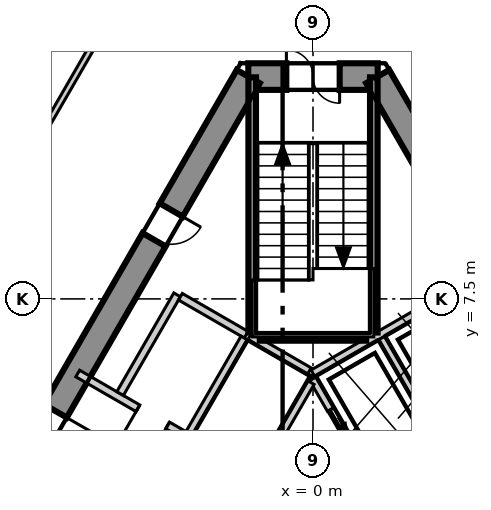
"""IFC4 building model, lengths in metres.
Left out: names, types, materials, properties, quantities, classifications, styles, units other than length and angle.
Written with IfcOpenShell. Run it as: python <this file> out.ifc"""

import sys

from ifc_helpers import new_model, si_unit, direction, frame, frame_2d, origin, place, context, subcontext, project, spatial, polyline, rectangle, outline, extrude, element, fill, save


model = new_model("IFC4")
c1 = context("Model", 3, precision=1e-05, world=origin(), true_north=direction((0.0, 1.0)))
c2 = subcontext(c1, "Body", "Model", "MODEL_VIEW")
j1 = project(units=[si_unit("LENGTHUNIT", "METRE"), si_unit("PLANEANGLEUNIT", "RADIAN")], contexts=[c1])
p1 = place(None, origin())
s1 = spatial("IfcSite", under=j1, at=p1, CompositionType="ELEMENT")
p2 = place(p1, origin())
s2 = spatial("IfcBuilding", under=s1, at=p2, CompositionType="ELEMENT")
p3 = place(p2, frame((0.0, 0.0, 203.3)))
s3 = spatial("IfcBuildingStorey", under=s2, at=p3, CompositionType="ELEMENT", Elevation=203.3)
p4 = place(p3, frame((1.703, 13.35, -0.3), z_axis=(0.0, 0.0, 1.0), x_axis=(-1.0, 0.0, 0.0)))
e1 = element("IfcWall", 1, at=p4, inside=s3, PredefinedType="SHEAR", context=c2, shape_type="SweptSolid", body=[
    extrude(outline(polyline([(-0.202, -0.35), (1.703, -0.35), (3.608, -0.35), (3.204, 0.35), (1.703, 0.35), (0.202, 0.35), (-0.202, -0.35)])), origin(), (0.0, 0.0, 1.0), 4.0),
])
p5 = place(p4, frame((1.003, 0.0, 0.3)))
e2 = element("IfcOpeningElement", 2, at=p5, cuts=e1, PredefinedType="OPENING", context=c2, shape_type="SweptSolid", body=[
    extrude(rectangle(XDim=1.4, YDim=2.1, at=frame_2d((0.7, 1.05))), frame((0.0, 0.36, 0.0), z_axis=(0.0, -1.0, 0.0), x_axis=(1.0, 0.0, 0.0)), (0.0, 0.0, 1.0), 0.72),
])
p6 = place(p3, frame((-1.703, 13.35, -0.3), z_axis=(0.0, 0.0, 1.0), x_axis=(-0.500011533395, -0.866018744874, 0.0)))
e3 = element("IfcWall", 3, at=p6, inside=s3, PredefinedType="SHEAR", context=c2, shape_type="SweptSolid", body=[
    extrude(outline(polyline([(-0.202, -0.35), (1.782, -0.35), (3.766, -0.35), (5.75, -0.35), (7.734, -0.35), (9.718, -0.35), (11.702, -0.35), (13.686, -0.35), (15.67, -0.35), (17.654, -0.35), (19.638, -0.35), (21.622, -0.35), (21.218, 0.35), (19.307, 0.35), (17.397, 0.35), (15.486, 0.35), (13.576, 0.35), (11.665, 0.35), (9.755, 0.35), (7.844, 0.35), (5.934, 0.35), (4.023, 0.35), (2.113, 0.35), (0.202, 0.35), (-0.202, -0.35)])), origin(), (0.0, 0.0, 1.0), 4.0),
])
p7 = place(p6, frame((10.16, 0.0, 0.3)))
e4 = element("IfcOpeningElement", 4, at=p7, cuts=e3, PredefinedType="OPENING", context=c2, shape_type="SweptSolid", body=[
    extrude(rectangle(XDim=1.1, YDim=2.1, at=frame_2d((0.55, 1.05))), frame((0.0, 0.36, 0.0), z_axis=(0.0, -1.0, 0.0), x_axis=(1.0, 0.0, 0.0)), (0.0, 0.0, 1.0), 0.72),
])
p8 = place(p6, frame((4.055, 0.0, 0.3)))
e5 = element("IfcOpeningElement", 5, at=p8, cuts=e3, PredefinedType="OPENING", context=c2, shape_type="SweptSolid", body=[
    extrude(rectangle(XDim=0.9, YDim=2.1, at=frame_2d((0.45, 1.05))), frame((0.0, 0.36, 0.0), z_axis=(0.0, -1.0, 0.0), x_axis=(1.0, 0.0, 0.0)), (0.0, 0.0, 1.0), 0.72),
])
p9 = place(p3, frame((12.413, -5.2, -0.3), z_axis=(0.0, 0.0, 1.0), x_axis=(-0.500011533395, 0.866018744874, 0.0)))
e6 = element("IfcWall", 6, at=p9, inside=s3, PredefinedType="SHEAR", context=c2, shape_type="SweptSolid", body=[
    extrude(outline(polyline([(-0.202, -0.35), (1.782, -0.35), (3.766, -0.35), (5.75, -0.35), (7.734, -0.35), (9.718, -0.35), (11.702, -0.35), (13.686, -0.35), (15.67, -0.35), (17.654, -0.35), (19.638, -0.35), (21.622, -0.35), (21.218, 0.35), (19.307, 0.35), (17.397, 0.35), (15.486, 0.35), (13.576, 0.35), (11.665, 0.35), (9.755, 0.35), (7.844, 0.35), (5.934, 0.35), (4.023, 0.35), (2.113, 0.35), (0.202, 0.35), (-0.202, -0.35)])), origin(), (0.0, 0.0, 1.0), 4.0),
])
p10 = place(p9, frame((4.055, 0.0, 0.3)))
e7 = element("IfcOpeningElement", 7, at=p10, cuts=e6, PredefinedType="OPENING", context=c2, shape_type="SweptSolid", body=[
    extrude(rectangle(XDim=0.9, YDim=2.1, at=frame_2d((0.45, 1.05))), frame((0.0, 0.36, 0.0), z_axis=(0.0, -1.0, 0.0), x_axis=(1.0, 0.0, 0.0)), (0.0, 0.0, 1.0), 0.72),
])
p11 = place(p9, frame((16.415, 0.0, 0.3)))
e8 = element("IfcOpeningElement", 8, at=p11, cuts=e6, PredefinedType="OPENING", context=c2, shape_type="SweptSolid", body=[
    extrude(rectangle(XDim=1.0, YDim=2.1, at=frame_2d((0.5, 1.05))), frame((0.0, 0.36, 0.0), z_axis=(0.0, -1.0, 0.0), x_axis=(1.0, 0.0, 0.0)), (0.0, 0.0, 1.0), 0.72),
])
p12 = place(p3, frame((-2.824, 31.513, 0.0), z_axis=(0.0, 0.0, 1.0), x_axis=(-0.500012324412, -0.866018288165, 0.0)))
e9 = element("IfcWall", 9, at=p12, inside=s3, PredefinedType="ELEMENTEDWALL", context=c2, shape_type="SweptSolid", body=[
    extrude(rectangle(XDim=51.739, YDim=0.2, at=frame_2d((25.87, 0.0))), origin(), (0.0, 0.0, 1.0), 3.7),
])
p13 = place(p12, frame((2.275, 0.0, 0.9)))
e10 = element("IfcOpeningElement", 10, at=p13, cuts=e9, PredefinedType="OPENING", context=c2, shape_type="SweptSolid", body=[
    extrude(rectangle(XDim=4.2, YDim=2.5, at=frame_2d((2.1, 1.25))), frame((0.0, 0.11, 0.0), z_axis=(0.0, -1.0, 0.0), x_axis=(1.0, 0.0, 0.0)), (0.0, 0.0, 1.0), 0.22),
])
p14 = place(p12, frame((8.419, 0.0, 0.9)))
e11 = element("IfcOpeningElement", 11, at=p14, cuts=e9, PredefinedType="OPENING", context=c2, shape_type="SweptSolid", body=[
    extrude(rectangle(XDim=4.2, YDim=2.5, at=frame_2d((2.1, 1.25))), frame((0.0, 0.11, 0.0), z_axis=(0.0, -1.0, 0.0), x_axis=(1.0, 0.0, 0.0)), (0.0, 0.0, 1.0), 0.22),
])
p15 = place(p12, frame((14.563, 0.0, 0.9)))
e12 = element("IfcOpeningElement", 12, at=p15, cuts=e9, PredefinedType="OPENING", context=c2, shape_type="SweptSolid", body=[
    extrude(rectangle(XDim=4.2, YDim=2.5, at=frame_2d((2.1, 1.25))), frame((0.0, 0.11, 0.0), z_axis=(0.0, -1.0, 0.0), x_axis=(1.0, 0.0, 0.0)), (0.0, 0.0, 1.0), 0.22),
])
p16 = place(p12, frame((20.707, 0.0, 0.9)))
e13 = element("IfcOpeningElement", 13, at=p16, cuts=e9, PredefinedType="OPENING", context=c2, shape_type="SweptSolid", body=[
    extrude(rectangle(XDim=4.2, YDim=2.5, at=frame_2d((2.1, 1.25))), frame((0.0, 0.11, 0.0), z_axis=(0.0, -1.0, 0.0), x_axis=(1.0, 0.0, 0.0)), (0.0, 0.0, 1.0), 0.22),
])
p17 = place(p12, frame((26.851, 0.0, 0.9)))
e14 = element("IfcOpeningElement", 14, at=p17, cuts=e9, PredefinedType="OPENING", context=c2, shape_type="SweptSolid", body=[
    extrude(rectangle(XDim=4.2, YDim=2.5, at=frame_2d((2.1, 1.25))), frame((0.0, 0.11, 0.0), z_axis=(0.0, -1.0, 0.0), x_axis=(1.0, 0.0, 0.0)), (0.0, 0.0, 1.0), 0.22),
])
p18 = place(p12, frame((32.995, 0.0, 0.9)))
e15 = element("IfcOpeningElement", 15, at=p18, cuts=e9, PredefinedType="OPENING", context=c2, shape_type="SweptSolid", body=[
    extrude(rectangle(XDim=4.2, YDim=2.5, at=frame_2d((2.1, 1.25))), frame((0.0, 0.11, 0.0), z_axis=(0.0, -1.0, 0.0), x_axis=(1.0, 0.0, 0.0)), (0.0, 0.0, 1.0), 0.22),
])
p19 = place(p12, frame((39.14, 0.0, 0.9)))
e16 = element("IfcOpeningElement", 16, at=p19, cuts=e9, PredefinedType="OPENING", context=c2, shape_type="SweptSolid", body=[
    extrude(rectangle(XDim=4.2, YDim=2.5, at=frame_2d((2.1, 1.25))), frame((0.0, 0.11, 0.0), z_axis=(0.0, -1.0, 0.0), x_axis=(1.0, 0.0, 0.0)), (0.0, 0.0, 1.0), 0.22),
])
p20 = place(p12, frame((45.284, 0.0, 0.9)))
e17 = element("IfcOpeningElement", 17, at=p20, cuts=e9, PredefinedType="OPENING", context=c2, shape_type="SweptSolid", body=[
    extrude(rectangle(XDim=4.2, YDim=2.5, at=frame_2d((2.1, 1.25))), frame((0.0, 0.11, 0.0), z_axis=(0.0, -1.0, 0.0), x_axis=(1.0, 0.0, 0.0)), (0.0, 0.0, 1.0), 0.22),
])
p21 = place(p3, frame((-20.883, -11.97, 0.0), z_axis=(0.0, 0.0, 1.0), x_axis=(0.500006150555, 0.866021852731, 0.0)))
e18 = element("IfcWall", 18, at=p21, inside=s3, PredefinedType="PARTITIONING", context=c2, shape_type="SweptSolid", body=[
    extrude(rectangle(XDim=41.766, YDim=0.15, at=frame_2d((20.883, 0.0))), origin(), (0.0, 0.0, 1.0), 3.7),
])
p22 = place(p21, frame((36.916, 0.0, 0.0)))
e19 = element("IfcOpeningElement", 19, at=p22, cuts=e18, PredefinedType="OPENING", context=c2, shape_type="SweptSolid", body=[
    extrude(rectangle(XDim=1.1, YDim=2.1, at=frame_2d((0.55, 1.05))), frame((0.0, 0.085, 0.0), z_axis=(0.0, -1.0, 0.0), x_axis=(1.0, 0.0, 0.0)), (0.0, 0.0, 1.0), 0.17),
])
p23 = place(p21, frame((26.446, 0.0, 0.0)))
e20 = element("IfcOpeningElement", 20, at=p23, cuts=e18, PredefinedType="OPENING", context=c2, shape_type="SweptSolid", body=[
    extrude(rectangle(XDim=1.1, YDim=2.1, at=frame_2d((0.55, 1.05))), frame((0.0, 0.085, 0.0), z_axis=(0.0, -1.0, 0.0), x_axis=(1.0, 0.0, 0.0)), (0.0, 0.0, 1.0), 0.17),
])
p24 = place(p21, frame((9.757, 0.0, 0.0)))
e21 = element("IfcOpeningElement", 21, at=p24, cuts=e18, PredefinedType="OPENING", context=c2, shape_type="SweptSolid", body=[
    extrude(rectangle(XDim=1.1, YDim=2.1, at=frame_2d((0.55, 1.05))), frame((0.0, 0.085, 0.0), z_axis=(0.0, -1.0, 0.0), x_axis=(1.0, 0.0, 0.0)), (0.0, 0.0, 1.0), 0.17),
])
p25 = place(p21, frame((18.757, 0.0, 0.0)))
e22 = element("IfcOpeningElement", 22, at=p25, cuts=e18, PredefinedType="OPENING", context=c2, shape_type="SweptSolid", body=[
    extrude(rectangle(XDim=0.9, YDim=2.1, at=frame_2d((0.45, 1.05))), frame((0.0, 0.085, 0.0), z_axis=(0.0, -1.0, 0.0), x_axis=(1.0, 0.0, 0.0)), (0.0, 0.0, 1.0), 0.17),
])
p26 = place(p21, frame((15.557, 0.0, 0.0)))
e23 = element("IfcOpeningElement", 23, at=p26, cuts=e18, PredefinedType="OPENING", context=c2, shape_type="SweptSolid", body=[
    extrude(rectangle(XDim=0.9, YDim=2.1, at=frame_2d((0.45, 1.05))), frame((0.0, 0.085, 0.0), z_axis=(0.0, -1.0, 0.0), x_axis=(1.0, 0.0, 0.0)), (0.0, 0.0, 1.0), 0.17),
])
p27 = place(p21, frame((12.657, 0.0, 0.0)))
e24 = element("IfcOpeningElement", 24, at=p27, cuts=e18, PredefinedType="OPENING", context=c2, shape_type="SweptSolid", body=[
    extrude(rectangle(XDim=1.0, YDim=2.1, at=frame_2d((0.5, 1.05))), frame((0.0, 0.085, 0.0), z_axis=(0.0, -1.0, 0.0), x_axis=(1.0, 0.0, 0.0)), (0.0, 0.0, 1.0), 0.17),
])
p28 = place(p21, frame((3.669, 0.0, 0.0)))
e25 = element("IfcOpeningElement", 25, at=p28, cuts=e18, PredefinedType="OPENING", context=c2, shape_type="SweptSolid", body=[
    extrude(rectangle(XDim=1.1, YDim=2.1, at=frame_2d((0.55, 1.05))), frame((0.0, 0.085, 0.0), z_axis=(0.0, -1.0, 0.0), x_axis=(1.0, 0.0, 0.0)), (0.0, 0.0, 1.0), 0.17),
])
p29 = place(p3, frame((0.075, 24.07, 0.0), z_axis=(0.0, 0.0, 1.0), x_axis=(0.500006834213, -0.866021458014, 0.0)))
e26 = element("IfcWall", 26, at=p29, inside=s3, PredefinedType="PARTITIONING", context=c2, shape_type="SweptSolid", body=[
    extrude(rectangle(XDim=41.616, YDim=0.15, at=frame_2d((20.808, 0.0))), origin(), (0.0, 0.0, 1.0), 3.7),
])
p30 = place(p29, frame((36.915, 0.0, 0.0)))
e27 = element("IfcOpeningElement", 27, at=p30, cuts=e26, PredefinedType="OPENING", context=c2, shape_type="SweptSolid", body=[
    extrude(rectangle(XDim=1.1, YDim=2.1, at=frame_2d((0.55, 1.05))), frame((0.0, 0.085, 0.0), z_axis=(0.0, -1.0, 0.0), x_axis=(1.0, 0.0, 0.0)), (0.0, 0.0, 1.0), 0.17),
])
p31 = place(p29, frame((22.046, 0.0, 0.0)))
e28 = element("IfcOpeningElement", 28, at=p31, cuts=e26, PredefinedType="OPENING", context=c2, shape_type="SweptSolid", body=[
    extrude(rectangle(XDim=1.1, YDim=2.1, at=frame_2d((0.55, 1.05))), frame((0.0, 0.085, 0.0), z_axis=(0.0, -1.0, 0.0), x_axis=(1.0, 0.0, 0.0)), (0.0, 0.0, 1.0), 0.17),
])
p32 = place(p29, frame((31.046, 0.0, 0.0)))
e29 = element("IfcOpeningElement", 29, at=p32, cuts=e26, PredefinedType="OPENING", context=c2, shape_type="SweptSolid", body=[
    extrude(rectangle(XDim=0.9, YDim=2.1, at=frame_2d((0.45, 1.05))), frame((0.0, 0.085, 0.0), z_axis=(0.0, -1.0, 0.0), x_axis=(1.0, 0.0, 0.0)), (0.0, 0.0, 1.0), 0.17),
])
p33 = place(p29, frame((27.846, 0.0, 0.0)))
e30 = element("IfcOpeningElement", 30, at=p33, cuts=e26, PredefinedType="OPENING", context=c2, shape_type="SweptSolid", body=[
    extrude(rectangle(XDim=0.9, YDim=2.1, at=frame_2d((0.45, 1.05))), frame((0.0, 0.085, 0.0), z_axis=(0.0, -1.0, 0.0), x_axis=(1.0, 0.0, 0.0)), (0.0, 0.0, 1.0), 0.17),
])
p34 = place(p29, frame((24.946, 0.0, 0.0)))
e31 = element("IfcOpeningElement", 31, at=p34, cuts=e26, PredefinedType="OPENING", context=c2, shape_type="SweptSolid", body=[
    extrude(rectangle(XDim=1.0, YDim=2.1, at=frame_2d((0.5, 1.05))), frame((0.0, 0.085, 0.0), z_axis=(0.0, -1.0, 0.0), x_axis=(1.0, 0.0, 0.0)), (0.0, 0.0, 1.0), 0.17),
])
p35 = place(p29, frame((17.258, 0.0, 0.0)))
e32 = element("IfcOpeningElement", 32, at=p35, cuts=e26, PredefinedType="OPENING", context=c2, shape_type="SweptSolid", body=[
    extrude(rectangle(XDim=1.0, YDim=2.1, at=frame_2d((0.5, 1.05))), frame((0.0, 0.085, 0.0), z_axis=(0.0, -1.0, 0.0), x_axis=(1.0, 0.0, 0.0)), (0.0, 0.0, 1.0), 0.17),
])
p36 = place(p29, frame((11.114, 0.0, 0.0)))
e33 = element("IfcOpeningElement", 33, at=p36, cuts=e26, PredefinedType="OPENING", context=c2, shape_type="SweptSolid", body=[
    extrude(rectangle(XDim=1.0, YDim=2.1, at=frame_2d((0.5, 1.05))), frame((0.0, 0.085, 0.0), z_axis=(0.0, -1.0, 0.0), x_axis=(1.0, 0.0, 0.0)), (0.0, 0.0, 1.0), 0.17),
])
p37 = place(p29, frame((3.669, 0.0, 0.0)))
e34 = element("IfcOpeningElement", 34, at=p37, cuts=e26, PredefinedType="OPENING", context=c2, shape_type="SweptSolid", body=[
    extrude(rectangle(XDim=1.0, YDim=2.1, at=frame_2d((0.5, 1.05))), frame((0.0, 0.085, 0.0), z_axis=(0.0, -1.0, 0.0), x_axis=(1.0, 0.0, 0.0)), (0.0, 0.0, 1.0), 0.17),
])
p38 = place(p3, frame((-12.82, 7.488, 0.0), z_axis=(0.0, 0.0, 1.0), x_axis=(0.500060781096, 0.865990308958, 0.0)))
e35 = element("IfcWall", 35, at=p38, inside=s3, PredefinedType="PARTITIONING", context=c2, shape_type="SweptSolid", body=[
    extrude(rectangle(XDim=12.139, YDim=0.15, at=frame_2d((6.069, 0.0))), origin(), (0.0, 0.0, 1.0), 3.7),
])
p39 = place(p38, frame((5.564, 0.0, 0.0)))
e36 = element("IfcOpeningElement", 36, at=p39, cuts=e35, PredefinedType="OPENING", context=c2, shape_type="SweptSolid", body=[
    extrude(rectangle(XDim=1.0, YDim=2.1, at=frame_2d((0.5, 1.05))), frame((0.0, 0.085, 0.0), z_axis=(0.0, -1.0, 0.0), x_axis=(1.0, 0.0, 0.0)), (0.0, 0.0, 1.0), 0.17),
])
p40 = place(p3, frame((-0.002, 5.541, 0.0), z_axis=(0.0, 0.0, 1.0), x_axis=(0.86600155993, 0.500041296494, 0.0)))
e37 = element("IfcWall", 37, at=p40, inside=s3, PredefinedType="SOLIDWALL", context=c2, shape_type="SweptSolid", body=[
    extrude(rectangle(XDim=4.132, YDim=0.2, at=frame_2d((2.066, 0.0))), origin(), (0.0, 0.0, 1.0), 3.7),
])
p41 = place(p3, frame((0.0, 5.4, 0.0), z_axis=(0.0, 0.0, 1.0), x_axis=(0.500103862429, -0.865965430478, 0.0)))
e38 = element("IfcWall", 38, at=p41, inside=s3, PredefinedType="SOLIDWALL", context=c2, shape_type="SweptSolid", body=[
    extrude(rectangle(XDim=2.973, YDim=0.2, at=frame_2d((1.487, 0.0))), origin(), (0.0, 0.0, 1.0), 3.7),
])
p42 = place(p41, frame((0.937, 0.0, 0.0)))
e39 = element("IfcOpeningElement", 39, at=p42, cuts=e38, PredefinedType="OPENING", context=c2, shape_type="SweptSolid", body=[
    extrude(rectangle(XDim=1.1, YDim=2.1, at=frame_2d((0.55, 1.05))), frame((0.0, 0.11, 0.0), z_axis=(0.0, -1.0, 0.0), x_axis=(1.0, 0.0, 0.0)), (0.0, 0.0, 1.0), 0.22),
])
p43 = place(p3, frame((1.578, 2.874, 0.0), z_axis=(0.0, 0.0, 1.0), x_axis=(0.866045911672, 0.499964477614, 0.0)))
e40 = element("IfcWall", 40, at=p43, inside=s3, PredefinedType="SOLIDWALL", context=c2, shape_type="SweptSolid", body=[
    extrude(rectangle(XDim=5.327, YDim=0.2, at=frame_2d((2.663, 0.0))), origin(), (0.0, 0.0, 1.0), 3.7),
])
p44 = place(p43, frame((2.496, 0.0, 0.0)))
e41 = element("IfcOpeningElement", 41, at=p44, cuts=e40, PredefinedType="OPENING", context=c2, shape_type="SweptSolid", body=[
    extrude(rectangle(XDim=1.1, YDim=2.1, at=frame_2d((0.55, 1.05))), frame((0.0, 0.11, 0.0), z_axis=(0.0, -1.0, 0.0), x_axis=(1.0, 0.0, 0.0)), (0.0, 0.0, 1.0), 0.22),
])
p45 = place(p3, frame((1.807, 6.47, 0.0), z_axis=(0.0, 0.0, 1.0), x_axis=(0.50012328804, -0.865954211699, 0.0)))
e42 = element("IfcWall", 42, at=p45, inside=s3, PredefinedType="SOLIDWALL", context=c2, shape_type="SweptSolid", body=[
    extrude(rectangle(XDim=2.9, YDim=0.2, at=frame_2d((1.45, 0.0))), origin(), (0.0, 0.0, 1.0), 3.7),
])
p46 = place(p3, frame((-6.191, 5.537, 0.0), z_axis=(0.0, 0.0, 1.0), x_axis=(0.866052607023, -0.499952879648, 0.0)))
e43 = element("IfcWall", 43, at=p46, inside=s3, PredefinedType="SOLIDWALL", context=c2, shape_type="SweptSolid", body=[
    extrude(rectangle(XDim=3.332, YDim=0.2, at=frame_2d((1.666, 0.0))), origin(), (0.0, 0.0, 1.0), 3.7),
])
p47 = place(p46, frame((1.83, 0.0, 0.0)))
e44 = element("IfcOpeningElement", 44, at=p47, cuts=e43, PredefinedType="OPENING", context=c2, shape_type="SweptSolid", body=[
    extrude(rectangle(XDim=0.9, YDim=2.1, at=frame_2d((0.45, 1.05))), frame((0.0, 0.11, 0.0), z_axis=(0.0, -1.0, 0.0), x_axis=(1.0, 0.0, 0.0)), (0.0, 0.0, 1.0), 0.22),
])
p48 = place(p3, frame((-5.076, 5.009, 0.0), z_axis=(0.0, 0.0, 1.0), x_axis=(0.50002537861, 0.866010750942, 0.0)))
e45 = element("IfcWall", 45, at=p48, inside=s3, PredefinedType="SOLIDWALL", context=c2, shape_type="SweptSolid", body=[
    extrude(rectangle(XDim=3.0, YDim=0.2, at=frame_2d((1.5, 0.0))), origin(), (0.0, 0.0, 1.0), 3.7),
])
p49 = place(p3, frame((-3.489, 7.557, 0.0), z_axis=(0.0, 0.0, 1.0), x_axis=(0.866010750942, -0.50002537861, 0.0)))
e46 = element("IfcWall", 46, at=p49, inside=s3, PredefinedType="SOLIDWALL", context=c2, shape_type="SweptSolid", body=[
    extrude(rectangle(XDim=2.0, YDim=0.2, at=frame_2d((1.0, 0.0))), origin(), (0.0, 0.0, 1.0), 3.7),
])
p50 = place(p3, frame((-3.257, 3.959, 0.0), z_axis=(0.0, 0.0, 1.0), x_axis=(0.50012328804, 0.865954211699, 0.0)))
e47 = element("IfcWall", 47, at=p50, inside=s3, PredefinedType="SOLIDWALL", context=c2, shape_type="SweptSolid", body=[
    extrude(rectangle(XDim=2.9, YDim=0.2, at=frame_2d((1.45, 0.0))), origin(), (0.0, 0.0, 1.0), 3.7),
])
p51 = place(p3, frame((-1.67, 6.507, 0.0), z_axis=(0.0, 0.0, 1.0), x_axis=(0.865941441609, -0.500145398563, 0.0)))
e48 = element("IfcWall", 48, at=p51, inside=s3, PredefinedType="SOLIDWALL", context=c2, shape_type="SweptSolid", body=[
    extrude(rectangle(XDim=1.815, YDim=0.2, at=frame_2d((0.908, 0.0))), origin(), (0.0, 0.0, 1.0), 3.7),
])
p52 = place(p3, frame((-1.438, 2.909, 0.0), z_axis=(0.0, 0.0, 1.0), x_axis=(0.499829630636, 0.866123744241, 0.0)))
e49 = element("IfcWall", 49, at=p52, inside=s3, PredefinedType="SOLIDWALL", context=c2, shape_type="SweptSolid", body=[
    extrude(rectangle(XDim=2.761, YDim=0.2, at=frame_2d((1.38, 0.0))), origin(), (0.0, 0.0, 1.0), 3.7),
])
p53 = place(p3, frame((1.6, 6.615, 0.0), z_axis=(0.0, 0.0, 1.0), x_axis=(0.0, 1.0, 0.0)))
e50 = element("IfcWall", 50, at=p53, inside=s3, PredefinedType="SOLIDWALL", context=c2, shape_type="SweptSolid", body=[
    extrude(rectangle(XDim=6.715, YDim=0.2, at=frame_2d((3.357, 0.0))), origin(), (0.0, 0.0, 1.0), 3.7),
])
p54 = place(p3, frame((-1.4, 6.5, 0.0), z_axis=(0.0, 0.0, 1.0), x_axis=(1.0, 0.0, 0.0)))
e51 = element("IfcWall", 51, at=p54, inside=s3, PredefinedType="SOLIDWALL", context=c2, shape_type="SweptSolid", body=[
    extrude(rectangle(XDim=2.8, YDim=0.2, at=frame_2d((1.4, 0.0))), origin(), (0.0, 0.0, 1.0), 3.7),
])
p55 = place(p3, frame((-1.6, 6.615, 0.0), z_axis=(0.0, 0.0, 1.0), x_axis=(0.0, 1.0, 0.0)))
e52 = element("IfcWall", 52, at=p55, inside=s3, PredefinedType="SOLIDWALL", context=c2, shape_type="SweptSolid", body=[
    extrude(rectangle(XDim=6.715, YDim=0.2, at=frame_2d((3.357, 0.0))), origin(), (0.0, 0.0, 1.0), 3.7),
])
p56 = place(p42, origin())
e53 = element("IfcDoor", 53, at=p56, inside=s3, OperationType="SLIDING_TO_LEFT", PredefinedType="DOOR", context=c2, shape_type="SweptSolid", body=[
    extrude(rectangle(XDim=1.1, YDim=2.1, at=frame_2d((0.55, 1.05))), frame((0.0, 0.025, 0.0), z_axis=(0.0, -1.0, 0.0), x_axis=(1.0, 0.0, 0.0)), (0.0, 0.0, 1.0), 0.05),
])
fill(e39, e53)
p57 = place(p47, origin())
e54 = element("IfcDoor", 54, at=p57, inside=s3, OperationType="SINGLE_SWING_LEFT", PredefinedType="DOOR", context=c2, shape_type="SweptSolid", body=[
    extrude(rectangle(XDim=0.9, YDim=2.1, at=frame_2d((0.45, 1.05))), frame((0.0, 0.025, 0.0), z_axis=(0.0, -1.0, 0.0), x_axis=(1.0, 0.0, 0.0)), (0.0, 0.0, 1.0), 0.05),
])
fill(e44, e54)
p58 = place(p5, origin())
e55 = element("IfcDoor", 55, at=p58, inside=s3, OperationType="DOUBLE_DOOR_SINGLE_SWING", PredefinedType="DOOR", context=c2, shape_type="SweptSolid", body=[
    extrude(rectangle(XDim=1.4, YDim=2.1, at=frame_2d((0.7, 1.05))), frame((0.0, 0.025, 0.0), z_axis=(0.0, -1.0, 0.0), x_axis=(1.0, 0.0, 0.0)), (0.0, 0.0, 1.0), 0.05),
])
fill(e2, e55)
p59 = place(p7, origin())
e56 = element("IfcDoor", 56, at=p59, inside=s3, OperationType="SINGLE_SWING_RIGHT", PredefinedType="DOOR", context=c2, shape_type="SweptSolid", body=[
    extrude(rectangle(XDim=1.1, YDim=2.1, at=frame_2d((0.55, 1.05))), frame((0.0, 0.025, 0.0), z_axis=(0.0, -1.0, 0.0), x_axis=(1.0, 0.0, 0.0)), (0.0, 0.0, 1.0), 0.05),
])
fill(e4, e56)
p60 = place(p8, origin())
e57 = element("IfcDoor", 57, at=p60, inside=s3, OperationType="SINGLE_SWING_RIGHT", PredefinedType="DOOR", context=c2, shape_type="SweptSolid", body=[
    extrude(rectangle(XDim=0.9, YDim=2.1, at=frame_2d((0.45, 1.05))), frame((0.0, 0.025, 0.0), z_axis=(0.0, -1.0, 0.0), x_axis=(1.0, 0.0, 0.0)), (0.0, 0.0, 1.0), 0.05),
])
fill(e5, e57)
save(model, sys.argv[1])
